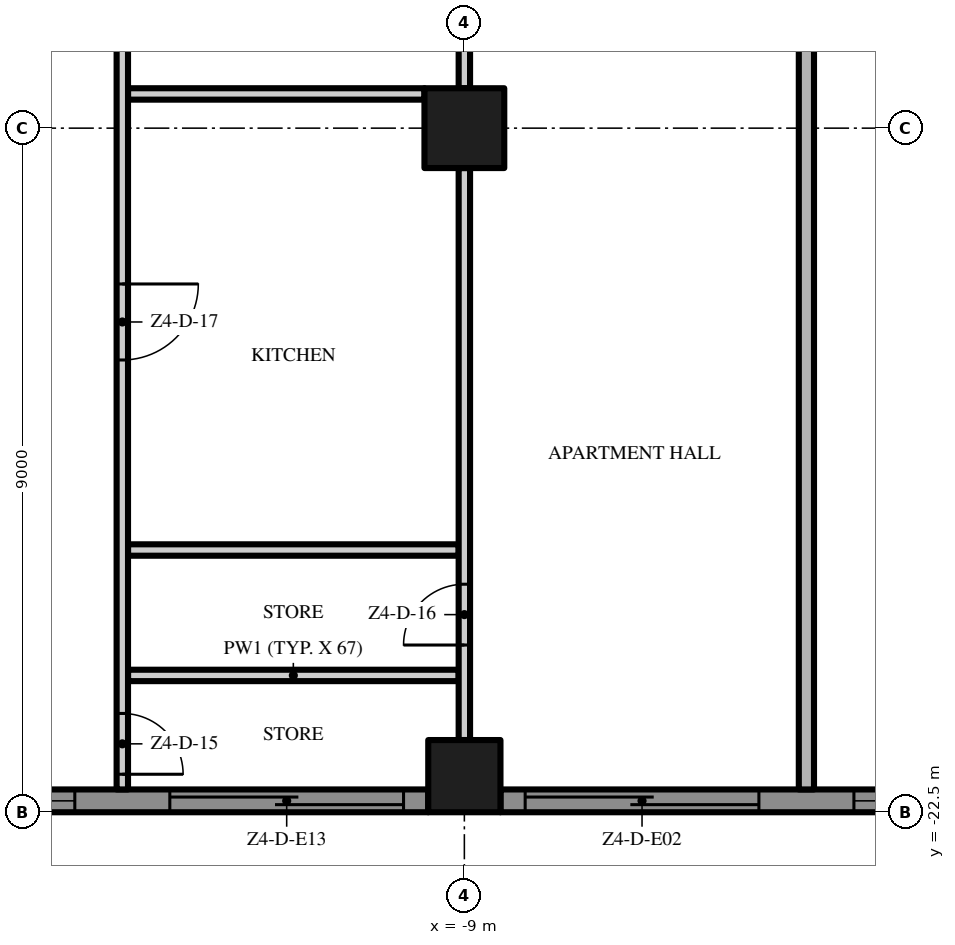
"""IFC4 building model, lengths in metres.
Left out: names, types, materials, properties, quantities, classifications, styles, units other than length and angle.
Written with IfcOpenShell. Run it as: python <this file> out.ifc"""

import sys

from ifc_helpers import new_model, si_unit, direction, frame, frame_2d, origin, origin_2d, place, context, subcontext, project, spatial, polyline, rectangle, outline, extrude, element, fill, save


model = new_model("IFC4")
c1 = context("Model", 3, precision=1e-05, world=origin(), true_north=direction((0.0, 1.0)))
c2 = subcontext(c1, "Body", "Model", "MODEL_VIEW")
j1 = project(units=[si_unit("LENGTHUNIT", "METRE"), si_unit("PLANEANGLEUNIT", "RADIAN")], contexts=[c1])
p1 = place(None, origin())
s1 = spatial("IfcSite", under=j1, at=p1, CompositionType="ELEMENT")
p2 = place(p1, origin())
s2 = spatial("IfcBuilding", under=s1, at=p2, CompositionType="ELEMENT")
p3 = place(p2, frame((0.0, 0.0, 222.4)))
s3 = spatial("IfcBuildingStorey", under=s2, at=p3, CompositionType="ELEMENT", Elevation=222.4)
p4 = place(p3, frame((-9.0, -13.5, 0.0), z_axis=(0.0, 0.0, 1.0), x_axis=(1.0, 0.0, 0.0)))
e1 = element("IfcColumn", 1, at=p4, inside=s3, PredefinedType="COLUMN", context=c2, shape_type="SweptSolid", body=[
    extrude(rectangle(XDim=1.05, YDim=1.05, at=origin_2d()), origin(), (0.0, 0.0, 1.0), 3.5),
])
p5 = place(p3, frame((-9.0, -22.025, 0.0), z_axis=(0.0, 0.0, 1.0), x_axis=(1.0, 0.0, 0.0)))
e2 = element("IfcColumn", 2, at=p5, inside=s3, PredefinedType="COLUMN", context=c2, shape_type="SweptSolid", body=[
    extrude(rectangle(XDim=0.95, YDim=0.95, at=origin_2d()), origin(), (0.0, 0.0, 1.0), 3.5),
])
p6 = place(p3, frame((-9.475, -22.35, 0.0), z_axis=(0.0, 0.0, 1.0), x_axis=(-1.0, 0.0, 0.0)))
e3 = element("IfcWall", 3, at=p6, inside=s3, PredefinedType="SOLIDWALL", context=c2, shape_type="SweptSolid", body=[
    extrude(rectangle(XDim=8.05, YDim=0.3, at=frame_2d((4.025, 0.0))), origin(), (0.0, 0.0, 1.0), 3.5),
])
p7 = place(p6, frame((4.65, 0.0, 0.45)))
e4 = element("IfcOpeningElement", 4, at=p7, cuts=e3, PredefinedType="OPENING", context=c2, shape_type="SweptSolid", body=[
    extrude(rectangle(XDim=3.075, YDim=2.65, at=frame_2d((1.538, 1.325))), frame((0.0, 0.16, 0.0), z_axis=(0.0, -1.0, 0.0), x_axis=(1.0, 0.0, 0.0)), (0.0, 0.0, 1.0), 0.32),
])
p8 = place(p6, frame((0.325, 0.0, 0.0)))
e5 = element("IfcOpeningElement", 5, at=p8, cuts=e3, PredefinedType="OPENING", context=c2, shape_type="SweptSolid", body=[
    extrude(rectangle(XDim=3.075, YDim=2.4, at=frame_2d((1.538, 1.2))), frame((0.0, 0.16, 0.0), z_axis=(0.0, -1.0, 0.0), x_axis=(1.0, 0.0, 0.0)), (0.0, 0.0, 1.0), 0.32),
])
p9 = place(p3, frame((-0.475, -22.35, 0.0), z_axis=(0.0, 0.0, 1.0), x_axis=(-1.0, 0.0, 0.0)))
e6 = element("IfcWall", 6, at=p9, inside=s3, PredefinedType="SOLIDWALL", context=c2, shape_type="SweptSolid", body=[
    extrude(rectangle(XDim=8.05, YDim=0.3, at=frame_2d((4.025, 0.0))), origin(), (0.0, 0.0, 1.0), 3.5),
])
p10 = place(p9, frame((4.65, 0.0, 0.0)))
e7 = element("IfcOpeningElement", 7, at=p10, cuts=e6, PredefinedType="OPENING", context=c2, shape_type="SweptSolid", body=[
    extrude(rectangle(XDim=3.075, YDim=2.4, at=frame_2d((1.538, 1.2))), frame((0.0, 0.16, 0.0), z_axis=(0.0, -1.0, 0.0), x_axis=(1.0, 0.0, 0.0)), (0.0, 0.0, 1.0), 0.32),
])
p11 = place(p9, frame((0.325, 0.0, 0.45)))
e8 = element("IfcOpeningElement", 8, at=p11, cuts=e6, PredefinedType="OPENING", context=c2, shape_type="SweptSolid", body=[
    extrude(rectangle(XDim=3.075, YDim=2.65, at=frame_2d((1.538, 1.325))), frame((0.0, 0.16, 0.0), z_axis=(0.0, -1.0, 0.0), x_axis=(1.0, 0.0, 0.0)), (0.0, 0.0, 1.0), 0.32),
])
p12 = place(p3, origin())
e9 = element("IfcWall", 9, at=p12, inside=s3, PredefinedType="USERDEFINED", context=c2, shape_type="SweptSolid", body=[
    extrude(outline(polyline([(-22.5, -25.149), (-21.0, -24.488), (-19.5, -23.755), (-18.0, -23.231), (-16.875, -23.1), (-16.5, -23.115), (-15.0, -23.451), (-13.5, -24.112), (-12.0, -24.845), (-10.5, -25.369), (-9.375, -25.5), (-9.0, -25.485), (-7.5, -25.149), (-6.0, -24.488), (-4.5, -23.755), (-3.0, -23.231), (-1.875, -23.1), (-1.5, -23.115), (0.0, -23.451), (1.5, -24.112), (3.0, -24.845), (4.5, -25.369), (5.625, -25.5), (6.0, -25.485), (7.5, -25.149), (9.0, -24.488), (10.5, -23.755), (12.0, -23.231), (13.125, -23.1), (13.5, -23.115), (15.0, -23.451), (16.5, -24.112), (18.0, -24.845), (19.5, -25.369), (20.625, -25.5), (21.0, -25.485), (22.5, -25.149), (22.445, -24.905), (20.967, -25.236), (20.635, -25.249), (19.556, -25.124), (18.096, -24.614), (16.605, -23.885), (15.079, -23.213), (13.533, -22.866), (13.115, -22.849), (11.944, -22.986), (10.404, -23.524), (8.895, -24.261), (7.421, -24.91), (5.967, -25.236), (5.635, -25.249), (4.556, -25.124), (3.096, -24.614), (1.605, -23.885), (0.079, -23.213), (-1.467, -22.866), (-1.885, -22.849), (-3.056, -22.986), (-4.596, -23.524), (-6.105, -24.261), (-7.579, -24.91), (-9.033, -25.236), (-9.365, -25.249), (-10.444, -25.124), (-11.904, -24.614), (-13.395, -23.885), (-14.921, -23.213), (-16.467, -22.866), (-16.885, -22.849), (-18.056, -22.986), (-19.596, -23.524), (-21.105, -24.261), (-22.601, -24.92), (-22.5, -25.149)])), origin(), (0.0, 0.0, 1.0), 0.9),
])
for number, where, z_axis, x_axis in (
    (10, (-13.425, -20.7, 0.0), (0.0, 0.0, 1.0), (1.0, 0.0, 0.0)),
    (11, (-13.425, -19.05, 0.0), (0.0, 0.0, 1.0), (1.0, 0.0, 0.0)),
):
    element("IfcWall", number, at=place(p3, frame(where, z_axis=z_axis, x_axis=x_axis)), inside=s3, PredefinedType="PARTITIONING", context=c2, shape_type="SweptSolid", body=[
        extrude(rectangle(XDim=4.35, YDim=0.15, at=frame_2d((2.175, 0.0))), origin(), (0.0, 0.0, 1.0), 3.5),
    ])
p13 = place(p3, frame((-13.425, -13.05, 0.0), z_axis=(0.0, 0.0, 1.0), x_axis=(1.0, 0.0, 0.0)))
e12 = element("IfcWall", 12, at=p13, inside=s3, PredefinedType="PARTITIONING", context=c2, shape_type="SweptSolid", body=[
    extrude(rectangle(XDim=3.9, YDim=0.15, at=frame_2d((1.95, 0.0))), origin(), (0.0, 0.0, 1.0), 3.5),
])
p14 = place(p3, frame((-13.5, -10.725, 0.0), z_axis=(0.0, 0.0, 1.0), x_axis=(0.0, -1.0, 0.0)))
e13 = element("IfcWall", 13, at=p14, inside=s3, PredefinedType="PARTITIONING", context=c2, shape_type="SweptSolid", body=[
    extrude(rectangle(XDim=11.475, YDim=0.15, at=frame_2d((5.737, 0.0))), origin(), (0.0, 0.0, 1.0), 3.5),
])
p15 = place(p14, frame((10.475, 0.0, 0.0)))
e14 = element("IfcOpeningElement", 14, at=p15, cuts=e13, PredefinedType="OPENING", context=c2, shape_type="SweptSolid", body=[
    extrude(rectangle(XDim=0.8, YDim=2.0, at=frame_2d((0.4, 1.0))), frame((0.0, 0.085, 0.0), z_axis=(0.0, -1.0, 0.0), x_axis=(1.0, 0.0, 0.0)), (0.0, 0.0, 1.0), 0.17),
])
p16 = place(p14, frame((4.825, 0.0, 0.0)))
e15 = element("IfcOpeningElement", 15, at=p16, cuts=e13, PredefinedType="OPENING", context=c2, shape_type="SweptSolid", body=[
    extrude(rectangle(XDim=1.0, YDim=2.4, at=frame_2d((0.5, 1.2))), frame((0.0, 0.085, 0.0), z_axis=(0.0, -1.0, 0.0), x_axis=(1.0, 0.0, 0.0)), (0.0, 0.0, 1.0), 0.17),
])
p17 = place(p3, frame((-9.0, -21.55, 0.0), z_axis=(0.0, 0.0, 1.0), x_axis=(0.0, 1.0, 0.0)))
e16 = element("IfcWall", 16, at=p17, inside=s3, PredefinedType="PARTITIONING", context=c2, shape_type="SweptSolid", body=[
    extrude(rectangle(XDim=7.525, YDim=0.15, at=frame_2d((3.763, 0.0))), origin(), (0.0, 0.0, 1.0), 3.5),
])
p18 = place(p17, frame((1.25, 0.0, 0.0)))
e17 = element("IfcOpeningElement", 17, at=p18, cuts=e16, PredefinedType="OPENING", context=c2, shape_type="SweptSolid", body=[
    extrude(rectangle(XDim=0.8, YDim=2.0, at=frame_2d((0.4, 1.0))), frame((0.0, 0.085, 0.0), z_axis=(0.0, -1.0, 0.0), x_axis=(1.0, 0.0, 0.0)), (0.0, 0.0, 1.0), 0.17),
])
p19 = place(p3, frame((-9.0, -12.975, 0.0), z_axis=(0.0, 0.0, 1.0), x_axis=(0.0, 1.0, 0.0)))
e18 = element("IfcWall", 18, at=p19, inside=s3, PredefinedType="PARTITIONING", context=c2, shape_type="SweptSolid", body=[
    extrude(rectangle(XDim=2.25, YDim=0.15, at=frame_2d((1.125, 0.0))), origin(), (0.0, 0.0, 1.0), 3.5),
])
p20 = place(p3, frame((-4.5, -22.2, 0.0), z_axis=(0.0, 0.0, 1.0), x_axis=(0.0, 1.0, 0.0)))
e19 = element("IfcWall", 19, at=p20, inside=s3, PredefinedType="PARTITIONING", context=c2, shape_type="SweptSolid", body=[
    extrude(rectangle(XDim=22.3, YDim=0.2, at=frame_2d((11.15, 0.0))), origin(), (0.0, 0.0, 1.0), 3.5),
])
p21 = place(p20, frame((10.2, 0.0, 0.0)))
e20 = element("IfcOpeningElement", 20, at=p21, cuts=e19, PredefinedType="OPENING", context=c2, shape_type="SweptSolid", body=[
    extrude(rectangle(XDim=1.5, YDim=2.4, at=frame_2d((0.75, 1.2))), frame((0.0, 0.11, 0.0), z_axis=(0.0, -1.0, 0.0), x_axis=(1.0, 0.0, 0.0)), (0.0, 0.0, 1.0), 0.22),
])
p22 = place(p7, origin())
e21 = element("IfcWindow", 21, at=p22, inside=s3, PartitioningType="SINGLE_PANEL", PredefinedType="WINDOW", context=c2, shape_type="SweptSolid", body=[
    extrude(rectangle(XDim=3.075, YDim=2.65, at=frame_2d((1.538, 1.325))), frame((0.0, 0.03, 0.0), z_axis=(0.0, -1.0, 0.0), x_axis=(1.0, 0.0, 0.0)), (0.0, 0.0, 1.0), 0.06),
])
fill(e4, e21)
p23 = place(p8, origin())
e22 = element("IfcDoor", 22, at=p23, inside=s3, OperationType="SINGLE_SWING_LEFT", PredefinedType="DOOR", context=c2, shape_type="SweptSolid", body=[
    extrude(rectangle(XDim=3.075, YDim=2.4, at=frame_2d((1.538, 1.2))), frame((0.0, 0.025, 0.0), z_axis=(0.0, -1.0, 0.0), x_axis=(1.0, 0.0, 0.0)), (0.0, 0.0, 1.0), 0.05),
])
fill(e5, e22)
p24 = place(p10, origin())
e23 = element("IfcDoor", 23, at=p24, inside=s3, OperationType="SINGLE_SWING_LEFT", PredefinedType="DOOR", context=c2, shape_type="SweptSolid", body=[
    extrude(rectangle(XDim=3.075, YDim=2.4, at=frame_2d((1.538, 1.2))), frame((0.0, 0.025, 0.0), z_axis=(0.0, -1.0, 0.0), x_axis=(1.0, 0.0, 0.0)), (0.0, 0.0, 1.0), 0.05),
])
fill(e7, e23)
p25 = place(p11, origin())
e24 = element("IfcWindow", 24, at=p25, inside=s3, PartitioningType="SINGLE_PANEL", PredefinedType="WINDOW", context=c2, shape_type="SweptSolid", body=[
    extrude(rectangle(XDim=3.075, YDim=2.65, at=frame_2d((1.538, 1.325))), frame((0.0, 0.03, 0.0), z_axis=(0.0, -1.0, 0.0), x_axis=(1.0, 0.0, 0.0)), (0.0, 0.0, 1.0), 0.06),
])
fill(e8, e24)
p26 = place(p15, origin())
e25 = element("IfcDoor", 25, at=p26, inside=s3, OperationType="SINGLE_SWING_RIGHT", PredefinedType="DOOR", context=c2, shape_type="SweptSolid", body=[
    extrude(rectangle(XDim=0.8, YDim=2.0, at=frame_2d((0.4, 1.0))), frame((0.0, 0.025, 0.0), z_axis=(0.0, -1.0, 0.0), x_axis=(1.0, 0.0, 0.0)), (0.0, 0.0, 1.0), 0.05),
])
fill(e14, e25)
p27 = place(p18, origin())
e26 = element("IfcDoor", 26, at=p27, inside=s3, OperationType="SINGLE_SWING_LEFT", PredefinedType="DOOR", context=c2, shape_type="SweptSolid", body=[
    extrude(rectangle(XDim=0.8, YDim=2.0, at=frame_2d((0.4, 1.0))), frame((0.0, 0.025, 0.0), z_axis=(0.0, -1.0, 0.0), x_axis=(1.0, 0.0, 0.0)), (0.0, 0.0, 1.0), 0.05),
])
fill(e17, e26)
p28 = place(p16, origin())
e27 = element("IfcDoor", 27, at=p28, inside=s3, OperationType="SINGLE_SWING_LEFT", PredefinedType="DOOR", context=c2, shape_type="SweptSolid", body=[
    extrude(rectangle(XDim=1.0, YDim=2.4, at=frame_2d((0.5, 1.2))), frame((0.0, 0.025, 0.0), z_axis=(0.0, -1.0, 0.0), x_axis=(1.0, 0.0, 0.0)), (0.0, 0.0, 1.0), 0.05),
])
fill(e15, e27)
save(model, sys.argv[1])
